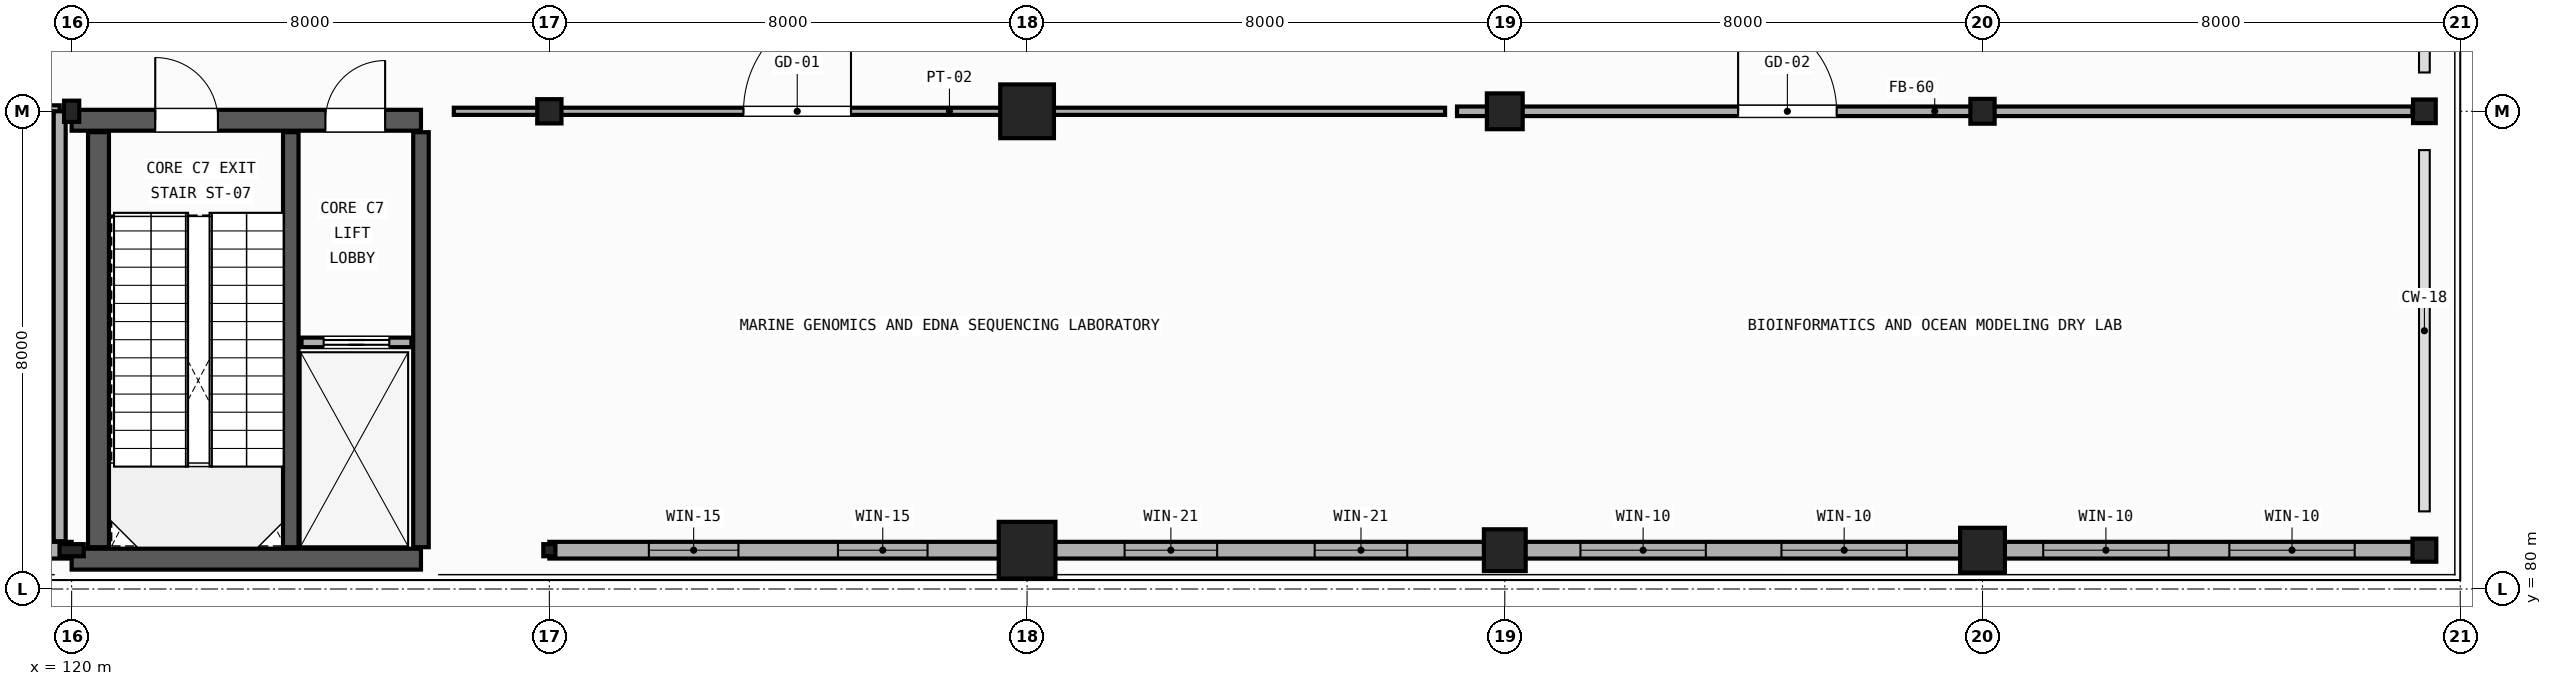
"""IFC4 building model, lengths in metres.
Left out: names, types, materials, properties, quantities, classifications, styles, units other than length and angle.
Written with IfcOpenShell. Run it as: python <this file> out.ifc"""

import sys

from ifc_helpers import new_model, si_unit, direction, frame, frame_2d, origin, origin_2d, place, context, subcontext, project, spatial, rectangle, hollow_rectangle, circle, hollow_circle, i_section, extrude, element, fill, save


model = new_model("IFC4")
c1 = context("Model", 3, precision=1e-05, world=origin(), true_north=direction((0.0, 1.0)))
c2 = subcontext(c1, "Body", "Model", "MODEL_VIEW")
j1 = project(units=[si_unit("LENGTHUNIT", "METRE"), si_unit("PLANEANGLEUNIT", "RADIAN")], contexts=[c1])
p1 = place(None, origin())
s1 = spatial("IfcSite", under=j1, at=p1, CompositionType="ELEMENT")
p2 = place(p1, origin())
s2 = spatial("IfcBuilding", under=s1, at=p2, CompositionType="ELEMENT")
p3 = place(p2, frame((0.0, 0.0, 10.2)))
s3 = spatial("IfcBuildingStorey", under=s2, at=p3, CompositionType="ELEMENT", Elevation=10.2)
p4 = place(p3, frame((120.0, 80.65, 0.0), z_axis=(0.0, 0.0, 1.0), x_axis=(0.0, 1.0, 0.0)))
e1 = element("IfcColumn", 1, at=p4, inside=s3, PredefinedType="COLUMN", context=c2, shape_type="SweptSolid", body=[
    extrude(hollow_rectangle(XDim=0.203, YDim=0.406, WallThickness=0.012, InnerFilletRadius=0.012, OuterFilletRadius=0.024, at=origin_2d()), origin(), (0.0, 0.0, 1.0), 4.56),
])
p5 = place(p3, frame((120.0, 88.0, 0.0), z_axis=(0.0, 0.0, 1.0), x_axis=(1.0, 0.0, 0.0)))
e2 = element("IfcColumn", 2, at=p5, inside=s3, PredefinedType="COLUMN", context=c2, shape_type="SweptSolid", body=[
    extrude(hollow_rectangle(XDim=0.254, YDim=0.356, WallThickness=0.012, InnerFilletRadius=0.012, OuterFilletRadius=0.024, at=origin_2d()), origin(), (0.0, 0.0, 1.0), 4.56),
])
p6 = place(p3, frame((128.0, 80.65, 0.0), z_axis=(0.0, 0.0, 1.0), x_axis=(1.0, 0.0, 0.0)))
e3 = element("IfcColumn", 3, at=p6, inside=s3, PredefinedType="COLUMN", context=c2, shape_type="SweptSolid", body=[
    extrude(hollow_rectangle(XDim=0.203, YDim=0.203, WallThickness=0.009, InnerFilletRadius=0.009, OuterFilletRadius=0.018, at=origin_2d()), origin(), (0.0, 0.0, 1.0), 4.56),
])
p7 = place(p3, frame((128.0, 88.0, 0.0), z_axis=(0.0, 0.0, 1.0), x_axis=(0.0, 1.0, 0.0)))
e4 = element("IfcColumn", 4, at=p7, inside=s3, PredefinedType="COLUMN", context=c2, shape_type="SweptSolid", body=[
    extrude(hollow_circle(Radius=0.203, WallThickness=0.012, at=origin_2d()), origin(), (0.0, 0.0, 1.0), 4.56),
])
p8 = place(p3, frame((136.0, 80.65, 0.0), z_axis=(0.0, 0.0, 1.0), x_axis=(0.0, 1.0, 0.0)))
e5 = element("IfcColumn", 5, at=p8, inside=s3, PredefinedType="COLUMN", context=c2, shape_type="SweptSolid", body=[
    extrude(rectangle(XDim=0.95, YDim=0.95, at=origin_2d()), origin(), (0.0, 0.0, 1.0), 4.56),
])
p9 = place(p3, frame((136.0, 88.0, 0.0), z_axis=(0.0, 0.0, 1.0), x_axis=(1.0, 0.0, 0.0)))
e6 = element("IfcColumn", 6, at=p9, inside=s3, PredefinedType="COLUMN", context=c2, shape_type="SweptSolid", body=[
    extrude(rectangle(XDim=0.9, YDim=0.9, at=origin_2d()), origin(), (0.0, 0.0, 1.0), 4.56),
])
p10 = place(p3, frame((144.0, 80.65, 0.0), z_axis=(0.0, 0.0, 1.0), x_axis=(1.0, 0.0, 0.0)))
e7 = element("IfcColumn", 7, at=p10, inside=s3, PredefinedType="COLUMN", context=c2, shape_type="SweptSolid", body=[
    extrude(rectangle(XDim=0.7, YDim=0.7, at=origin_2d()), origin(), (0.0, 0.0, 1.0), 4.56),
])
p11 = place(p3, frame((144.0, 88.0, 0.0), z_axis=(0.0, 0.0, 1.0), x_axis=(0.0, 1.0, 0.0)))
e8 = element("IfcColumn", 8, at=p11, inside=s3, PredefinedType="COLUMN", context=c2, shape_type="SweptSolid", body=[
    extrude(rectangle(XDim=0.6, YDim=0.6, at=origin_2d()), origin(), (0.0, 0.0, 1.0), 4.56),
])
p12 = place(p3, frame((152.0, 80.65, 0.0), z_axis=(0.0, 0.0, 1.0), x_axis=(0.0, 1.0, 0.0)))
e9 = element("IfcColumn", 9, at=p12, inside=s3, PredefinedType="COLUMN", context=c2, shape_type="SweptSolid", body=[
    extrude(circle(Radius=0.375, at=origin_2d()), origin(), (0.0, 0.0, 1.0), 4.56),
])
p13 = place(p3, frame((152.0, 88.0, 0.0), z_axis=(0.0, 0.0, 1.0), x_axis=(1.0, 0.0, 0.0)))
e10 = element("IfcColumn", 10, at=p13, inside=s3, PredefinedType="COLUMN", context=c2, shape_type="SweptSolid", body=[
    extrude(i_section(OverallWidth=0.406, OverallDepth=0.416, WebThickness=0.03, FlangeThickness=0.048, FilletRadius=0.015, at=origin_2d()), origin(), (0.0, 0.0, 1.0), 4.56),
])
p14 = place(p3, frame((159.4, 80.65, 0.0), z_axis=(0.0, 0.0, 1.0), x_axis=(1.0, 0.0, 0.0)))
e11 = element("IfcColumn", 11, at=p14, inside=s3, PredefinedType="COLUMN", context=c2, shape_type="SweptSolid", body=[
    extrude(i_section(OverallWidth=0.399, OverallDepth=0.386, WebThickness=0.021, FlangeThickness=0.033, FilletRadius=0.015, at=origin_2d()), origin(), (0.0, 0.0, 1.0), 4.56),
])
p15 = place(p3, frame((159.4, 88.0, 0.0), z_axis=(0.0, 0.0, 1.0), x_axis=(0.0, 1.0, 0.0)))
e12 = element("IfcColumn", 12, at=p15, inside=s3, PredefinedType="COLUMN", context=c2, shape_type="SweptSolid", body=[
    extrude(i_section(OverallWidth=0.395, OverallDepth=0.38, WebThickness=0.019, FlangeThickness=0.03, FilletRadius=0.015, at=origin_2d()), origin(), (0.0, 0.0, 1.0), 4.56),
])
p16 = place(p3, frame((112.65, 80.65, 0.0), z_axis=(0.0, 0.0, 1.0), x_axis=(1.0, 0.0, 0.0)))
e13 = element("IfcWall", 13, at=p16, inside=s3, PredefinedType="STANDARD", context=c2, shape_type="SweptSolid", body=[
    extrude(rectangle(XDim=7.35, YDim=0.28, at=frame_2d((3.675, 0.0))), origin(), (0.0, 0.0, 1.0), 3.918),
])
p17 = place(p16, frame((1.517, 0.0, 0.95)))
e14 = element("IfcOpeningElement", 14, at=p17, cuts=e13, PredefinedType="OPENING", context=c2, shape_type="SweptSolid", body=[
    extrude(rectangle(XDim=1.4, YDim=2.1, at=frame_2d((0.7, 1.05))), frame((0.0, 0.15, 0.0), z_axis=(0.0, -1.0, 0.0), x_axis=(1.0, 0.0, 0.0)), (0.0, 0.0, 1.0), 0.3),
])
p18 = place(p16, frame((4.433, 0.0, 0.95)))
e15 = element("IfcOpeningElement", 15, at=p18, cuts=e13, PredefinedType="OPENING", context=c2, shape_type="SweptSolid", body=[
    extrude(rectangle(XDim=1.4, YDim=2.1, at=frame_2d((0.7, 1.05))), frame((0.0, 0.15, 0.0), z_axis=(0.0, -1.0, 0.0), x_axis=(1.0, 0.0, 0.0)), (0.0, 0.0, 1.0), 0.3),
])
p19 = place(p3, frame((128.0, 80.65, 0.0), z_axis=(0.0, 0.0, 1.0), x_axis=(1.0, 0.0, 0.0)))
e16 = element("IfcWall", 16, at=p19, inside=s3, PredefinedType="STANDARD", context=c2, shape_type="SweptSolid", body=[
    extrude(rectangle(XDim=8.0, YDim=0.28, at=frame_2d((4.0, 0.0))), origin(), (0.0, 0.0, 1.0), 3.72),
])
p20 = place(p19, frame((1.667, 0.0, 2.35)))
e17 = element("IfcOpeningElement", 17, at=p20, cuts=e16, PredefinedType="OPENING", context=c2, shape_type="SweptSolid", body=[
    extrude(rectangle(XDim=1.5, YDim=1.0, at=frame_2d((0.75, 0.5))), frame((0.0, 0.15, 0.0), z_axis=(0.0, -1.0, 0.0), x_axis=(1.0, 0.0, 0.0)), (0.0, 0.0, 1.0), 0.3),
])
p21 = place(p19, frame((4.833, 0.0, 2.35)))
e18 = element("IfcOpeningElement", 18, at=p21, cuts=e16, PredefinedType="OPENING", context=c2, shape_type="SweptSolid", body=[
    extrude(rectangle(XDim=1.5, YDim=1.0, at=frame_2d((0.75, 0.5))), frame((0.0, 0.15, 0.0), z_axis=(0.0, -1.0, 0.0), x_axis=(1.0, 0.0, 0.0)), (0.0, 0.0, 1.0), 0.3),
])
p22 = place(p3, frame((136.0, 80.65, 0.0), z_axis=(0.0, 0.0, 1.0), x_axis=(1.0, 0.0, 0.0)))
e19 = element("IfcWall", 19, at=p22, inside=s3, PredefinedType="STANDARD", context=c2, shape_type="SweptSolid", body=[
    extrude(rectangle(XDim=8.0, YDim=0.28, at=frame_2d((4.0, 0.0))), origin(), (0.0, 0.0, 1.0), 3.72),
])
p23 = place(p22, frame((1.633, 0.0, 0.95)))
e20 = element("IfcOpeningElement", 20, at=p23, cuts=e19, PredefinedType="OPENING", context=c2, shape_type="SweptSolid", body=[
    extrude(rectangle(XDim=1.55, YDim=2.15, at=frame_2d((0.775, 1.075))), frame((0.0, 0.15, 0.0), z_axis=(0.0, -1.0, 0.0), x_axis=(1.0, 0.0, 0.0)), (0.0, 0.0, 1.0), 0.3),
])
p24 = place(p22, frame((4.817, 0.0, 0.95)))
e21 = element("IfcOpeningElement", 21, at=p24, cuts=e19, PredefinedType="OPENING", context=c2, shape_type="SweptSolid", body=[
    extrude(rectangle(XDim=1.55, YDim=2.15, at=frame_2d((0.775, 1.075))), frame((0.0, 0.15, 0.0), z_axis=(0.0, -1.0, 0.0), x_axis=(1.0, 0.0, 0.0)), (0.0, 0.0, 1.0), 0.3),
])
p25 = place(p3, frame((144.0, 80.65, 0.0), z_axis=(0.0, 0.0, 1.0), x_axis=(1.0, 0.0, 0.0)))
e22 = element("IfcWall", 22, at=p25, inside=s3, PredefinedType="STANDARD", context=c2, shape_type="SweptSolid", body=[
    extrude(rectangle(XDim=8.0, YDim=0.28, at=frame_2d((4.0, 0.0))), origin(), (0.0, 0.0, 1.0), 3.72),
])
p26 = place(p25, frame((1.267, 0.0, 1.0)))
e23 = element("IfcOpeningElement", 23, at=p26, cuts=e22, PredefinedType="OPENING", context=c2, shape_type="SweptSolid", body=[
    extrude(rectangle(XDim=2.1, YDim=1.9, at=frame_2d((1.05, 0.95))), frame((0.0, 0.15, 0.0), z_axis=(0.0, -1.0, 0.0), x_axis=(1.0, 0.0, 0.0)), (0.0, 0.0, 1.0), 0.3),
])
p27 = place(p25, frame((4.633, 0.0, 1.0)))
e24 = element("IfcOpeningElement", 24, at=p27, cuts=e22, PredefinedType="OPENING", context=c2, shape_type="SweptSolid", body=[
    extrude(rectangle(XDim=2.1, YDim=1.9, at=frame_2d((1.05, 0.95))), frame((0.0, 0.15, 0.0), z_axis=(0.0, -1.0, 0.0), x_axis=(1.0, 0.0, 0.0)), (0.0, 0.0, 1.0), 0.3),
])
p28 = place(p3, frame((152.0, 80.65, 0.0), z_axis=(0.0, 0.0, 1.0), x_axis=(1.0, 0.0, 0.0)))
e25 = element("IfcWall", 25, at=p28, inside=s3, PredefinedType="STANDARD", context=c2, shape_type="SweptSolid", body=[
    extrude(rectangle(XDim=7.25, YDim=0.28, at=frame_2d((3.625, 0.0))), origin(), (0.0, 0.0, 1.0), 3.837),
])
p29 = place(p28, frame((1.017, 0.0, 1.0)))
e26 = element("IfcOpeningElement", 26, at=p29, cuts=e25, PredefinedType="OPENING", context=c2, shape_type="SweptSolid", body=[
    extrude(rectangle(XDim=2.1, YDim=1.9, at=frame_2d((1.05, 0.95))), frame((0.0, 0.15, 0.0), z_axis=(0.0, -1.0, 0.0), x_axis=(1.0, 0.0, 0.0)), (0.0, 0.0, 1.0), 0.3),
])
p30 = place(p28, frame((4.133, 0.0, 1.0)))
e27 = element("IfcOpeningElement", 27, at=p30, cuts=e25, PredefinedType="OPENING", context=c2, shape_type="SweptSolid", body=[
    extrude(rectangle(XDim=2.1, YDim=1.9, at=frame_2d((1.05, 0.95))), frame((0.0, 0.15, 0.0), z_axis=(0.0, -1.0, 0.0), x_axis=(1.0, 0.0, 0.0)), (0.0, 0.0, 1.0), 0.3),
])
p31 = place(p3, frame((120.0, 87.85, 0.0), z_axis=(0.0, 0.0, 1.0), x_axis=(1.0, 0.0, 0.0)))
e28 = element("IfcWall", 28, at=p31, inside=s3, PredefinedType="SHEAR", context=c2, shape_type="SweptSolid", body=[
    extrude(rectangle(XDim=5.85, YDim=0.35, at=frame_2d((2.925, 0.0))), origin(), (0.0, 0.0, 1.0), 4.55),
])
p32 = place(p31, frame((1.4, 0.0, 0.0)))
e29 = element("IfcOpeningElement", 29, at=p32, cuts=e28, PredefinedType="OPENING", context=c2, shape_type="SweptSolid", body=[
    extrude(rectangle(XDim=1.05, YDim=2.1, at=frame_2d((0.525, 1.05))), frame((0.0, 0.185, 0.0), z_axis=(0.0, -1.0, 0.0), x_axis=(1.0, 0.0, 0.0)), (0.0, 0.0, 1.0), 0.37),
])
p33 = place(p31, frame((4.25, 0.0, 0.0)))
e30 = element("IfcOpeningElement", 30, at=p33, cuts=e28, PredefinedType="OPENING", context=c2, shape_type="SweptSolid", body=[
    extrude(rectangle(XDim=1.0, YDim=2.15, at=frame_2d((0.5, 1.075))), frame((0.0, 0.185, 0.0), z_axis=(0.0, -1.0, 0.0), x_axis=(1.0, 0.0, 0.0)), (0.0, 0.0, 1.0), 0.37),
])
p34 = place(p3, frame((120.0, 80.5, 0.0), z_axis=(0.0, 0.0, 1.0), x_axis=(1.0, 0.0, 0.0)))
e31 = element("IfcWall", 31, at=p34, inside=s3, PredefinedType="SHEAR", context=c2, shape_type="SweptSolid", body=[
    extrude(rectangle(XDim=5.85, YDim=0.35, at=frame_2d((2.925, 0.0))), origin(), (0.0, 0.0, 1.0), 4.55),
])
p35 = place(p3, frame((120.45, 80.7, 0.0), z_axis=(0.0, 0.0, 1.0), x_axis=(0.0, 1.0, 0.0)))
e32 = element("IfcWall", 32, at=p35, inside=s3, PredefinedType="SHEAR", context=c2, shape_type="SweptSolid", body=[
    extrude(rectangle(XDim=6.95, YDim=0.35, at=frame_2d((3.475, 0.0))), origin(), (0.0, 0.0, 1.0), 4.55),
])
for number, where, z_axis, x_axis in (
    (33, (125.85, 80.7, 0.0), (0.0, 0.0, 1.0), (0.0, 1.0, 0.0)),
    (34, (123.67, 80.7, 0.0), (0.0, 0.0, 1.0), (0.0, 1.0, 0.0)),
):
    element("IfcWall", number, at=place(p3, frame(where, z_axis=z_axis, x_axis=x_axis)), inside=s3, PredefinedType="SHEAR", context=c2, shape_type="SweptSolid", body=[
        extrude(rectangle(XDim=6.95, YDim=0.26, at=frame_2d((3.475, 0.0))), origin(), (0.0, 0.0, 1.0), 4.55),
    ])
p36 = place(p3, frame((123.85, 84.13, 0.0), z_axis=(0.0, 0.0, 1.0), x_axis=(1.0, 0.0, 0.0)))
e35 = element("IfcWall", 35, at=p36, inside=s3, PredefinedType="PARTITIONING", context=c2, shape_type="SweptSolid", body=[
    extrude(rectangle(XDim=1.84, YDim=0.16, at=frame_2d((0.92, 0.0))), origin(), (0.0, 0.0, 1.0), 3.6),
])
p37 = place(p36, frame((0.37, 0.0, 0.0)))
e36 = element("IfcOpeningElement", 36, at=p37, cuts=e35, PredefinedType="OPENING", context=c2, shape_type="SweptSolid", body=[
    extrude(rectangle(XDim=1.1, YDim=2.15, at=frame_2d((0.55, 1.075))), frame((0.0, 0.09, 0.0), z_axis=(0.0, -1.0, 0.0), x_axis=(1.0, 0.0, 0.0)), (0.0, 0.0, 1.0), 0.18),
])
p38 = place(p3, frame((113.0, 88.0, 0.0), z_axis=(0.0, 0.0, 1.0), x_axis=(1.0, 0.0, 0.0)))
e37 = element("IfcWall", 37, at=p38, inside=s3, PredefinedType="PLUMBINGWALL", context=c2, shape_type="SweptSolid", body=[
    extrude(rectangle(XDim=6.8, YDim=0.2, at=frame_2d((3.4, 0.0))), origin(), (0.0, 0.0, 1.0), 3.908),
])
p39 = place(p38, frame((2.945, 0.0, 0.0)))
e38 = element("IfcOpeningElement", 38, at=p39, cuts=e37, PredefinedType="OPENING", context=c2, shape_type="SweptSolid", body=[
    extrude(rectangle(XDim=0.91, YDim=2.1, at=frame_2d((0.455, 1.05))), frame((0.0, 0.11, 0.0), z_axis=(0.0, -1.0, 0.0), x_axis=(1.0, 0.0, 0.0)), (0.0, 0.0, 1.0), 0.22),
])
p40 = place(p3, frame((119.8, 80.8, 0.0), z_axis=(0.0, 0.0, 1.0), x_axis=(0.0, 1.0, 0.0)))
e39 = element("IfcWall", 39, at=p40, inside=s3, PredefinedType="PLUMBINGWALL", context=c2, shape_type="SweptSolid", body=[
    extrude(rectangle(XDim=7.2, YDim=0.2, at=frame_2d((3.6, 0.0))), origin(), (0.0, 0.0, 1.0), 3.918),
])
p41 = place(p3, frame((126.4, 88.0, 0.0), z_axis=(0.0, 0.0, 1.0), x_axis=(1.0, 0.0, 0.0)))
e40 = element("IfcWall", 40, at=p41, inside=s3, PredefinedType="PARTITIONING", context=c2, shape_type="SweptSolid", body=[
    extrude(rectangle(XDim=16.6, YDim=0.12, at=frame_2d((8.3, 0.0))), origin(), (0.0, 0.0, 1.0), 3.758),
])
p42 = place(p41, frame((4.851, 0.0, 0.0)))
e41 = element("IfcOpeningElement", 41, at=p42, cuts=e40, PredefinedType="OPENING", context=c2, shape_type="SweptSolid", body=[
    extrude(rectangle(XDim=1.8, YDim=2.4, at=frame_2d((0.9, 1.2))), frame((0.0, 0.07, 0.0), z_axis=(0.0, -1.0, 0.0), x_axis=(1.0, 0.0, 0.0)), (0.0, 0.0, 1.0), 0.14),
])
p43 = place(p3, frame((143.2, 88.0, 0.0), z_axis=(0.0, 0.0, 1.0), x_axis=(1.0, 0.0, 0.0)))
e42 = element("IfcWall", 42, at=p43, inside=s3, PredefinedType="PARTITIONING", context=c2, shape_type="SweptSolid", body=[
    extrude(rectangle(XDim=16.0, YDim=0.16, at=frame_2d((8.0, 0.0))), origin(), (0.0, 0.0, 1.0), 3.758),
])
p44 = place(p43, frame((4.707, 0.0, 0.0)))
e43 = element("IfcOpeningElement", 43, at=p44, cuts=e42, PredefinedType="OPENING", context=c2, shape_type="SweptSolid", body=[
    extrude(rectangle(XDim=1.65, YDim=2.35, at=frame_2d((0.825, 1.175))), frame((0.0, 0.09, 0.0), z_axis=(0.0, -1.0, 0.0), x_axis=(1.0, 0.0, 0.0)), (0.0, 0.0, 1.0), 0.18),
])
p45 = place(p20, origin())
e44 = element("IfcWindow", 44, at=p45, inside=s3, PartitioningType="SINGLE_PANEL", PredefinedType="WINDOW", context=c2, shape_type="SweptSolid", body=[
    extrude(rectangle(XDim=1.5, YDim=1.0, at=frame_2d((0.75, 0.5))), frame((0.0, 0.03, 0.0), z_axis=(0.0, -1.0, 0.0), x_axis=(1.0, 0.0, 0.0)), (0.0, 0.0, 1.0), 0.06),
])
fill(e17, e44)
p46 = place(p21, origin())
e45 = element("IfcWindow", 45, at=p46, inside=s3, PartitioningType="SINGLE_PANEL", PredefinedType="WINDOW", context=c2, shape_type="SweptSolid", body=[
    extrude(rectangle(XDim=1.5, YDim=1.0, at=frame_2d((0.75, 0.5))), frame((0.0, 0.03, 0.0), z_axis=(0.0, -1.0, 0.0), x_axis=(1.0, 0.0, 0.0)), (0.0, 0.0, 1.0), 0.06),
])
fill(e18, e45)
p47 = place(p23, origin())
e46 = element("IfcWindow", 46, at=p47, inside=s3, PartitioningType="SINGLE_PANEL", PredefinedType="WINDOW", context=c2, shape_type="SweptSolid", body=[
    extrude(rectangle(XDim=1.55, YDim=2.15, at=frame_2d((0.775, 1.075))), frame((0.0, 0.03, 0.0), z_axis=(0.0, -1.0, 0.0), x_axis=(1.0, 0.0, 0.0)), (0.0, 0.0, 1.0), 0.06),
])
fill(e20, e46)
p48 = place(p24, origin())
e47 = element("IfcWindow", 47, at=p48, inside=s3, PartitioningType="SINGLE_PANEL", PredefinedType="WINDOW", context=c2, shape_type="SweptSolid", body=[
    extrude(rectangle(XDim=1.55, YDim=2.15, at=frame_2d((0.775, 1.075))), frame((0.0, 0.03, 0.0), z_axis=(0.0, -1.0, 0.0), x_axis=(1.0, 0.0, 0.0)), (0.0, 0.0, 1.0), 0.06),
])
fill(e21, e47)
p49 = place(p26, origin())
e48 = element("IfcWindow", 48, at=p49, inside=s3, PartitioningType="SINGLE_PANEL", PredefinedType="WINDOW", context=c2, shape_type="SweptSolid", body=[
    extrude(rectangle(XDim=2.1, YDim=1.9, at=frame_2d((1.05, 0.95))), frame((0.0, 0.03, 0.0), z_axis=(0.0, -1.0, 0.0), x_axis=(1.0, 0.0, 0.0)), (0.0, 0.0, 1.0), 0.06),
])
fill(e23, e48)
p50 = place(p27, origin())
e49 = element("IfcWindow", 49, at=p50, inside=s3, PartitioningType="SINGLE_PANEL", PredefinedType="WINDOW", context=c2, shape_type="SweptSolid", body=[
    extrude(rectangle(XDim=2.1, YDim=1.9, at=frame_2d((1.05, 0.95))), frame((0.0, 0.03, 0.0), z_axis=(0.0, -1.0, 0.0), x_axis=(1.0, 0.0, 0.0)), (0.0, 0.0, 1.0), 0.06),
])
fill(e24, e49)
p51 = place(p29, origin())
e50 = element("IfcWindow", 50, at=p51, inside=s3, PartitioningType="SINGLE_PANEL", PredefinedType="WINDOW", context=c2, shape_type="SweptSolid", body=[
    extrude(rectangle(XDim=2.1, YDim=1.9, at=frame_2d((1.05, 0.95))), frame((0.0, 0.03, 0.0), z_axis=(0.0, -1.0, 0.0), x_axis=(1.0, 0.0, 0.0)), (0.0, 0.0, 1.0), 0.06),
])
fill(e26, e50)
p52 = place(p30, origin())
e51 = element("IfcWindow", 51, at=p52, inside=s3, PartitioningType="SINGLE_PANEL", PredefinedType="WINDOW", context=c2, shape_type="SweptSolid", body=[
    extrude(rectangle(XDim=2.1, YDim=1.9, at=frame_2d((1.05, 0.95))), frame((0.0, 0.03, 0.0), z_axis=(0.0, -1.0, 0.0), x_axis=(1.0, 0.0, 0.0)), (0.0, 0.0, 1.0), 0.06),
])
fill(e27, e51)
p53 = place(p37, origin())
e52 = element("IfcDoor", 52, at=p53, inside=s3, OperationType="SLIDING_TO_LEFT", PredefinedType="DOOR", context=c2, shape_type="SweptSolid", body=[
    extrude(rectangle(XDim=1.1, YDim=2.15, at=frame_2d((0.55, 1.075))), frame((0.0, 0.025, 0.0), z_axis=(0.0, -1.0, 0.0), x_axis=(1.0, 0.0, 0.0)), (0.0, 0.0, 1.0), 0.05),
])
fill(e36, e52)
p54 = place(p32, origin())
e53 = element("IfcDoor", 53, at=p54, inside=s3, OperationType="SINGLE_SWING_LEFT", PredefinedType="DOOR", context=c2, shape_type="SweptSolid", body=[
    extrude(rectangle(XDim=1.05, YDim=2.1, at=frame_2d((0.525, 1.05))), frame((0.0, 0.025, 0.0), z_axis=(0.0, -1.0, 0.0), x_axis=(1.0, 0.0, 0.0)), (0.0, 0.0, 1.0), 0.05),
])
fill(e29, e53)
p55 = place(p33, origin())
e54 = element("IfcDoor", 54, at=p55, inside=s3, OperationType="SINGLE_SWING_RIGHT", PredefinedType="DOOR", context=c2, shape_type="SweptSolid", body=[
    extrude(rectangle(XDim=1.0, YDim=2.15, at=frame_2d((0.5, 1.075))), frame((0.0, 0.025, 0.0), z_axis=(0.0, -1.0, 0.0), x_axis=(1.0, 0.0, 0.0)), (0.0, 0.0, 1.0), 0.05),
])
fill(e30, e54)
p56 = place(p42, origin())
e55 = element("IfcDoor", 55, at=p56, inside=s3, OperationType="SINGLE_SWING_RIGHT", PredefinedType="DOOR", context=c2, shape_type="SweptSolid", body=[
    extrude(rectangle(XDim=1.8, YDim=2.4, at=frame_2d((0.9, 1.2))), frame((0.0, 0.025, 0.0), z_axis=(0.0, -1.0, 0.0), x_axis=(1.0, 0.0, 0.0)), (0.0, 0.0, 1.0), 0.05),
])
fill(e41, e55)
p57 = place(p44, origin())
e56 = element("IfcDoor", 56, at=p57, inside=s3, OperationType="SINGLE_SWING_LEFT", PredefinedType="DOOR", context=c2, shape_type="SweptSolid", body=[
    extrude(rectangle(XDim=1.65, YDim=2.35, at=frame_2d((0.825, 1.175))), frame((0.0, 0.025, 0.0), z_axis=(0.0, -1.0, 0.0), x_axis=(1.0, 0.0, 0.0)), (0.0, 0.0, 1.0), 0.05),
])
fill(e43, e56)
save(model, sys.argv[1])
